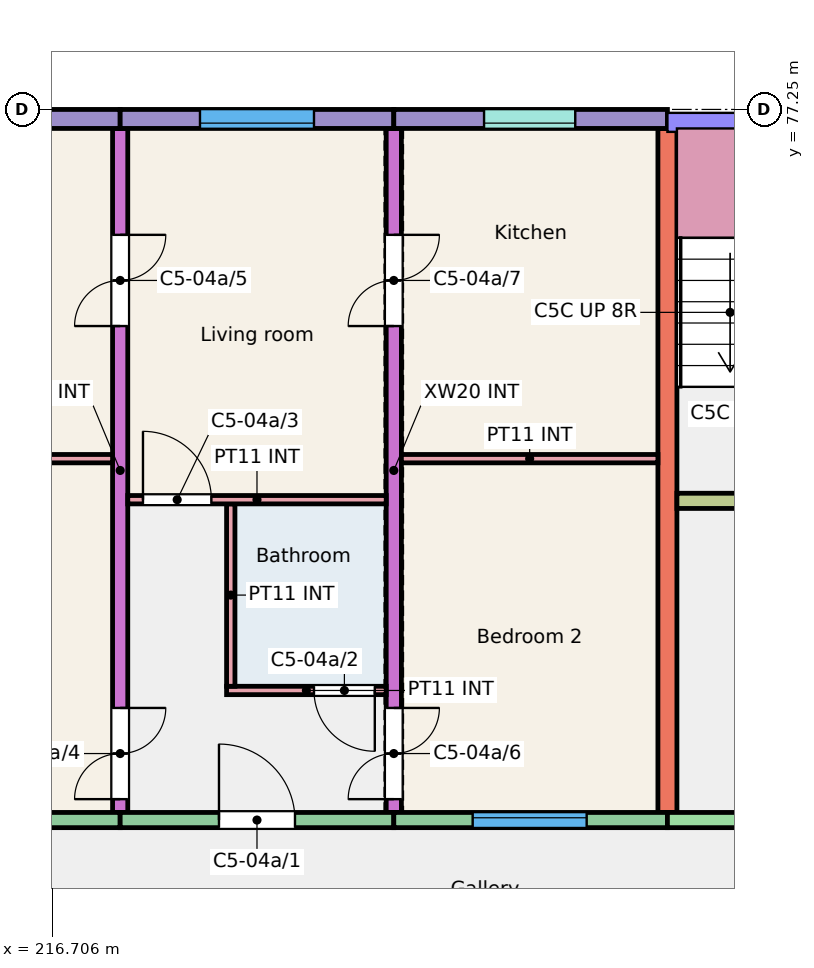
"""IFC4 building model, lengths in metres.
Left out: names, types, materials, properties, quantities, classifications, styles, units other than length and angle.
Written with IfcOpenShell. Run it as: python <this file> out.ifc"""

import sys

from ifc_helpers import new_model, si_unit, direction, frame, frame_2d, origin, place, context, subcontext, project, spatial, rectangle, extrude, element, fill, save


model = new_model("IFC4")
c1 = context("Model", 3, precision=1e-05, world=origin(), true_north=direction((0.0, 1.0)))
c2 = subcontext(c1, "Body", "Model", "MODEL_VIEW")
j1 = project(units=[si_unit("LENGTHUNIT", "METRE"), si_unit("PLANEANGLEUNIT", "RADIAN")], contexts=[c1])
p1 = place(None, origin())
s1 = spatial("IfcSite", under=j1, at=p1, CompositionType="ELEMENT")
p2 = place(p1, origin())
s2 = spatial("IfcBuilding", under=s1, at=p2, CompositionType="ELEMENT")
p3 = place(p2, frame((0.0, 0.0, 12.0)))
s3 = spatial("IfcBuildingStorey", under=s2, at=p3, CompositionType="ELEMENT", Elevation=12.0)
p4 = place(p3, frame((217.6, 68.0, 0.0), z_axis=(0.0, 0.0, 1.0), x_axis=(0.0, 1.0, 0.0)))
e1 = element("IfcWall", 1, at=p4, inside=s3, PredefinedType="SHEAR", context=c2, shape_type="SweptSolid", body=[
    extrude(rectangle(XDim=9.0, YDim=0.2, at=frame_2d((4.5, 0.0))), origin(), (0.0, 0.0, 1.0), 3.0),
])
p5 = place(p4, frame((0.175, 0.0, 0.0)))
e2 = element("IfcOpeningElement", 2, at=p5, cuts=e1, PredefinedType="OPENING", context=c2, shape_type="SweptSolid", body=[
    extrude(rectangle(XDim=1.2, YDim=2.1, at=frame_2d((0.6, 1.05))), frame((0.0, 0.11, 0.0), z_axis=(0.0, -1.0, 0.0), x_axis=(1.0, 0.0, 0.0)), (0.0, 0.0, 1.0), 0.22),
])
p6 = place(p4, frame((6.4, 0.0, 0.0)))
e3 = element("IfcOpeningElement", 3, at=p6, cuts=e1, PredefinedType="OPENING", context=c2, shape_type="SweptSolid", body=[
    extrude(rectangle(XDim=1.2, YDim=2.1, at=frame_2d((0.6, 1.05))), frame((0.0, 0.11, 0.0), z_axis=(0.0, -1.0, 0.0), x_axis=(1.0, 0.0, 0.0)), (0.0, 0.0, 1.0), 0.22),
])
p7 = place(p3, frame((221.2, 68.0, 0.0), z_axis=(0.0, 0.0, 1.0), x_axis=(0.0, 1.0, 0.0)))
e4 = element("IfcWall", 4, at=p7, inside=s3, PredefinedType="SHEAR", context=c2, shape_type="SweptSolid", body=[
    extrude(rectangle(XDim=9.0, YDim=0.2, at=frame_2d((4.5, 0.0))), origin(), (0.0, 0.0, 1.0), 3.0),
])
p8 = place(p7, frame((0.175, 0.0, 0.0)))
e5 = element("IfcOpeningElement", 5, at=p8, cuts=e4, PredefinedType="OPENING", context=c2, shape_type="SweptSolid", body=[
    extrude(rectangle(XDim=1.2, YDim=2.1, at=frame_2d((0.6, 1.05))), frame((0.0, 0.11, 0.0), z_axis=(0.0, -1.0, 0.0), x_axis=(1.0, 0.0, 0.0)), (0.0, 0.0, 1.0), 0.22),
])
p9 = place(p7, frame((6.4, 0.0, 0.0)))
e6 = element("IfcOpeningElement", 6, at=p9, cuts=e4, PredefinedType="OPENING", context=c2, shape_type="SweptSolid", body=[
    extrude(rectangle(XDim=1.2, YDim=2.1, at=frame_2d((0.6, 1.05))), frame((0.0, 0.11, 0.0), z_axis=(0.0, -1.0, 0.0), x_axis=(1.0, 0.0, 0.0)), (0.0, 0.0, 1.0), 0.22),
])
p10 = place(p3, frame((224.8, 68.0, 0.0), z_axis=(0.0, 0.0, 1.0), x_axis=(0.0, 1.0, 0.0)))
e7 = element("IfcWall", 7, at=p10, inside=s3, PredefinedType="SHEAR", context=c2, shape_type="SweptSolid", body=[
    extrude(rectangle(XDim=9.0, YDim=0.25, at=frame_2d((4.5, 0.0))), origin(), (0.0, 0.0, 1.0), 3.0),
])
p11 = place(p3, frame((214.0, 77.125, 0.0), z_axis=(0.0, 0.0, 1.0), x_axis=(1.0, 0.0, 0.0)))
e8 = element("IfcWall", 8, at=p11, inside=s3, PredefinedType="SOLIDWALL", context=c2, shape_type="SweptSolid", body=[
    extrude(rectangle(XDim=3.6, YDim=0.25, at=frame_2d((1.8, 0.0))), origin(), (0.0, 0.0, 1.0), 3.0),
])
p12 = place(p11, frame((1.075, 0.0, 0.9)))
e9 = element("IfcOpeningElement", 9, at=p12, cuts=e8, PredefinedType="OPENING", context=c2, shape_type="SweptSolid", body=[
    extrude(rectangle(XDim=1.5, YDim=1.5, at=frame_2d((0.75, 0.75))), frame((0.0, 0.135, 0.0), z_axis=(0.0, -1.0, 0.0), x_axis=(1.0, 0.0, 0.0)), (0.0, 0.0, 1.0), 0.27),
])
p13 = place(p3, frame((214.15, 67.9, 0.0), z_axis=(0.0, 0.0, 1.0), x_axis=(1.0, 0.0, 0.0)))
e10 = element("IfcWall", 10, at=p13, inside=s3, PredefinedType="SOLIDWALL", context=c2, shape_type="SweptSolid", body=[
    extrude(rectangle(XDim=3.45, YDim=0.2, at=frame_2d((1.725, 0.0))), origin(), (0.0, 0.0, 1.0), 3.0),
])
p14 = place(p13, frame((0.925, 0.0, 0.9)))
e11 = element("IfcOpeningElement", 11, at=p14, cuts=e10, PredefinedType="OPENING", context=c2, shape_type="SweptSolid", body=[
    extrude(rectangle(XDim=1.5, YDim=1.5, at=frame_2d((0.75, 0.75))), frame((0.0, 0.11, 0.0), z_axis=(0.0, -1.0, 0.0), x_axis=(1.0, 0.0, 0.0)), (0.0, 0.0, 1.0), 0.22),
])
p15 = place(p3, frame((217.6, 77.125, 0.0), z_axis=(0.0, 0.0, 1.0), x_axis=(1.0, 0.0, 0.0)))
e12 = element("IfcWall", 12, at=p15, inside=s3, PredefinedType="SOLIDWALL", context=c2, shape_type="SweptSolid", body=[
    extrude(rectangle(XDim=3.6, YDim=0.25, at=frame_2d((1.8, 0.0))), origin(), (0.0, 0.0, 1.0), 3.0),
])
p16 = place(p15, frame((1.05, 0.0, 0.9)))
e13 = element("IfcOpeningElement", 13, at=p16, cuts=e12, PredefinedType="OPENING", context=c2, shape_type="SweptSolid", body=[
    extrude(rectangle(XDim=1.5, YDim=1.5, at=frame_2d((0.75, 0.75))), frame((0.0, 0.135, 0.0), z_axis=(0.0, -1.0, 0.0), x_axis=(1.0, 0.0, 0.0)), (0.0, 0.0, 1.0), 0.27),
])
p17 = place(p3, frame((217.6, 67.9, 0.0), z_axis=(0.0, 0.0, 1.0), x_axis=(1.0, 0.0, 0.0)))
e14 = element("IfcWall", 14, at=p17, inside=s3, PredefinedType="SOLIDWALL", context=c2, shape_type="SweptSolid", body=[
    extrude(rectangle(XDim=3.6, YDim=0.2, at=frame_2d((1.8, 0.0))), origin(), (0.0, 0.0, 1.0), 3.0),
])
p18 = place(p17, frame((1.3, 0.0, 0.0)))
e15 = element("IfcOpeningElement", 15, at=p18, cuts=e14, PredefinedType="OPENING", context=c2, shape_type="SweptSolid", body=[
    extrude(rectangle(XDim=1.0, YDim=2.1, at=frame_2d((0.5, 1.05))), frame((0.0, 0.11, 0.0), z_axis=(0.0, -1.0, 0.0), x_axis=(1.0, 0.0, 0.0)), (0.0, 0.0, 1.0), 0.22),
])
p19 = place(p3, frame((221.2, 77.125, 0.0), z_axis=(0.0, 0.0, 1.0), x_axis=(1.0, 0.0, 0.0)))
e16 = element("IfcWall", 16, at=p19, inside=s3, PredefinedType="SOLIDWALL", context=c2, shape_type="SweptSolid", body=[
    extrude(rectangle(XDim=3.6, YDim=0.25, at=frame_2d((1.8, 0.0))), origin(), (0.0, 0.0, 1.0), 3.0),
])
p20 = place(p19, frame((1.188, 0.0, 1.1)))
e17 = element("IfcOpeningElement", 17, at=p20, cuts=e16, PredefinedType="OPENING", context=c2, shape_type="SweptSolid", body=[
    extrude(rectangle(XDim=1.2, YDim=1.3, at=frame_2d((0.6, 0.65))), frame((0.0, 0.135, 0.0), z_axis=(0.0, -1.0, 0.0), x_axis=(1.0, 0.0, 0.0)), (0.0, 0.0, 1.0), 0.27),
])
p21 = place(p3, frame((221.2, 67.9, 0.0), z_axis=(0.0, 0.0, 1.0), x_axis=(1.0, 0.0, 0.0)))
e18 = element("IfcWall", 18, at=p21, inside=s3, PredefinedType="SOLIDWALL", context=c2, shape_type="SweptSolid", body=[
    extrude(rectangle(XDim=3.6, YDim=0.2, at=frame_2d((1.8, 0.0))), origin(), (0.0, 0.0, 1.0), 3.0),
])
p22 = place(p21, frame((1.038, 0.0, 0.9)))
e19 = element("IfcOpeningElement", 19, at=p22, cuts=e18, PredefinedType="OPENING", context=c2, shape_type="SweptSolid", body=[
    extrude(rectangle(XDim=1.5, YDim=1.5, at=frame_2d((0.75, 0.75))), frame((0.0, 0.11, 0.0), z_axis=(0.0, -1.0, 0.0), x_axis=(1.0, 0.0, 0.0)), (0.0, 0.0, 1.0), 0.22),
])
p23 = place(p3, frame((224.8, 67.9, 0.0), z_axis=(0.0, 0.0, 1.0), x_axis=(1.0, 0.0, 0.0)))
e20 = element("IfcWall", 20, at=p23, inside=s3, PredefinedType="SHEAR", context=c2, shape_type="SweptSolid", body=[
    extrude(rectangle(XDim=5.85, YDim=0.2, at=frame_2d((2.925, 0.0))), origin(), (0.0, 0.0, 1.0), 3.0),
])
p24 = place(p23, frame((2.438, 0.0, 0.0)))
e21 = element("IfcOpeningElement", 21, at=p24, cuts=e20, PredefinedType="OPENING", context=c2, shape_type="SweptSolid", body=[
    extrude(rectangle(XDim=1.1, YDim=2.1, at=frame_2d((0.55, 1.05))), frame((0.0, 0.11, 0.0), z_axis=(0.0, -1.0, 0.0), x_axis=(1.0, 0.0, 0.0)), (0.0, 0.0, 1.0), 0.22),
])
p25 = place(p3, frame((224.925, 72.1, 0.0), z_axis=(0.0, 0.0, 1.0), x_axis=(1.0, 0.0, 0.0)))
e22 = element("IfcWall", 22, at=p25, inside=s3, PredefinedType="SHEAR", context=c2, shape_type="SweptSolid", body=[
    extrude(rectangle(XDim=5.725, YDim=0.2, at=frame_2d((2.862, 0.0))), origin(), (0.0, 0.0, 1.0), 3.0),
])
p26 = place(p25, frame((0.95, 0.0, 0.0)))
e23 = element("IfcOpeningElement", 23, at=p26, cuts=e22, PredefinedType="OPENING", context=c2, shape_type="SweptSolid", body=[
    extrude(rectangle(XDim=1.0, YDim=2.1, at=frame_2d((0.5, 1.05))), frame((0.0, 0.11, 0.0), z_axis=(0.0, -1.0, 0.0), x_axis=(1.0, 0.0, 0.0)), (0.0, 0.0, 1.0), 0.22),
])
p27 = place(p25, frame((3.863, 0.0, 0.0)))
e24 = element("IfcOpeningElement", 24, at=p27, cuts=e22, PredefinedType="OPENING", context=c2, shape_type="SweptSolid", body=[
    extrude(rectangle(XDim=1.1, YDim=2.1, at=frame_2d((0.55, 1.05))), frame((0.0, 0.11, 0.0), z_axis=(0.0, -1.0, 0.0), x_axis=(1.0, 0.0, 0.0)), (0.0, 0.0, 1.0), 0.22),
])
p28 = place(p3, frame((219.0, 69.605, 0.0), z_axis=(0.0, 0.0, 1.0), x_axis=(1.0, 0.0, 0.0)))
e25 = element("IfcWall", 25, at=p28, inside=s3, PredefinedType="PARTITIONING", context=c2, shape_type="SweptSolid", body=[
    extrude(rectangle(XDim=2.1, YDim=0.11, at=frame_2d((1.05, 0.0))), origin(), (0.0, 0.0, 1.0), 2.8),
])
p29 = place(p28, frame((1.15, 0.0, 0.0)))
e26 = element("IfcOpeningElement", 26, at=p29, cuts=e25, PredefinedType="OPENING", context=c2, shape_type="SweptSolid", body=[
    extrude(rectangle(XDim=0.8, YDim=2.1, at=frame_2d((0.4, 1.05))), frame((0.0, 0.065, 0.0), z_axis=(0.0, -1.0, 0.0), x_axis=(1.0, 0.0, 0.0)), (0.0, 0.0, 1.0), 0.13),
])
p30 = place(p3, frame((219.055, 69.66, 0.0), z_axis=(0.0, 0.0, 1.0), x_axis=(0.0, 1.0, 0.0)))
e27 = element("IfcWall", 27, at=p30, inside=s3, PredefinedType="PARTITIONING", context=c2, shape_type="SweptSolid", body=[
    extrude(rectangle(XDim=2.4, YDim=0.11, at=frame_2d((1.2, 0.0))), origin(), (0.0, 0.0, 1.0), 2.8),
])
p31 = place(p3, frame((217.7, 72.115, 0.0), z_axis=(0.0, 0.0, 1.0), x_axis=(1.0, 0.0, 0.0)))
e28 = element("IfcWall", 28, at=p31, inside=s3, PredefinedType="PARTITIONING", context=c2, shape_type="SweptSolid", body=[
    extrude(rectangle(XDim=3.4, YDim=0.11, at=frame_2d((1.7, 0.0))), origin(), (0.0, 0.0, 1.0), 2.8),
])
p32 = place(p31, frame((0.2, 0.0, 0.0)))
e29 = element("IfcOpeningElement", 29, at=p32, cuts=e28, PredefinedType="OPENING", context=c2, shape_type="SweptSolid", body=[
    extrude(rectangle(XDim=0.9, YDim=2.1, at=frame_2d((0.45, 1.05))), frame((0.0, 0.065, 0.0), z_axis=(0.0, -1.0, 0.0), x_axis=(1.0, 0.0, 0.0)), (0.0, 0.0, 1.0), 0.13),
])
p33 = place(p3, frame((214.15, 72.655, 0.0), z_axis=(0.0, 0.0, 1.0), x_axis=(1.0, 0.0, 0.0)))
e30 = element("IfcWall", 30, at=p33, inside=s3, PredefinedType="PARTITIONING", context=c2, shape_type="SweptSolid", body=[
    extrude(rectangle(XDim=3.35, YDim=0.11, at=frame_2d((1.675, 0.0))), origin(), (0.0, 0.0, 1.0), 2.8),
])
p34 = place(p3, frame((221.3, 72.655, 0.0), z_axis=(0.0, 0.0, 1.0), x_axis=(1.0, 0.0, 0.0)))
e31 = element("IfcWall", 31, at=p34, inside=s3, PredefinedType="PARTITIONING", context=c2, shape_type="SweptSolid", body=[
    extrude(rectangle(XDim=3.375, YDim=0.11, at=frame_2d((1.688, 0.0))), origin(), (0.0, 0.0, 1.0), 2.8),
])
p35 = place(p22, origin())
e32 = element("IfcWindow", 32, at=p35, inside=s3, PartitioningType="SINGLE_PANEL", PredefinedType="WINDOW", context=c2, shape_type="SweptSolid", body=[
    extrude(rectangle(XDim=1.5, YDim=1.5, at=frame_2d((0.75, 0.75))), frame((0.0, 0.06, 0.0), z_axis=(0.0, -1.0, 0.0), x_axis=(1.0, 0.0, 0.0)), (0.0, 0.0, 1.0), 0.06),
])
fill(e19, e32)
p36 = place(p20, origin())
e33 = element("IfcWindow", 33, at=p36, inside=s3, PartitioningType="SINGLE_PANEL", PredefinedType="WINDOW", context=c2, shape_type="SweptSolid", body=[
    extrude(rectangle(XDim=1.2, YDim=1.3, at=frame_2d((0.6, 0.65))), frame((0.0, -0.025, 0.0), z_axis=(0.0, -1.0, 0.0), x_axis=(1.0, 0.0, 0.0)), (0.0, 0.0, 1.0), 0.06),
])
fill(e17, e33)
p37 = place(p16, origin())
e34 = element("IfcWindow", 34, at=p37, inside=s3, PartitioningType="SINGLE_PANEL", PredefinedType="WINDOW", context=c2, shape_type="SweptSolid", body=[
    extrude(rectangle(XDim=1.5, YDim=1.5, at=frame_2d((0.75, 0.75))), frame((0.0, -0.025, 0.0), z_axis=(0.0, -1.0, 0.0), x_axis=(1.0, 0.0, 0.0)), (0.0, 0.0, 1.0), 0.06),
])
fill(e13, e34)
p38 = place(p18, origin())
e35 = element("IfcDoor", 35, at=p38, inside=s3, OperationType="SINGLE_SWING_LEFT", PredefinedType="DOOR", context=c2, shape_type="SweptSolid", body=[
    extrude(rectangle(XDim=1.0, YDim=2.1, at=frame_2d((0.5, 1.05))), frame((0.0, 0.025, 0.0), z_axis=(0.0, -1.0, 0.0), x_axis=(1.0, 0.0, 0.0)), (0.0, 0.0, 1.0), 0.05),
])
fill(e15, e35)
p39 = place(p29, origin())
e36 = element("IfcDoor", 36, at=p39, inside=s3, OperationType="SINGLE_SWING_RIGHT", PredefinedType="DOOR", context=c2, shape_type="SweptSolid", body=[
    extrude(rectangle(XDim=0.8, YDim=2.1, at=frame_2d((0.4, 1.05))), frame((0.0, 0.025, 0.0), z_axis=(0.0, -1.0, 0.0), x_axis=(1.0, 0.0, 0.0)), (0.0, 0.0, 1.0), 0.05),
])
fill(e26, e36)
p40 = place(p32, origin())
e37 = element("IfcDoor", 37, at=p40, inside=s3, OperationType="SINGLE_SWING_LEFT", PredefinedType="DOOR", context=c2, shape_type="SweptSolid", body=[
    extrude(rectangle(XDim=0.9, YDim=2.1, at=frame_2d((0.45, 1.05))), frame((0.0, 0.025, 0.0), z_axis=(0.0, -1.0, 0.0), x_axis=(1.0, 0.0, 0.0)), (0.0, 0.0, 1.0), 0.05),
])
fill(e29, e37)
p41 = place(p5, origin())
e38 = element("IfcDoor", 38, at=p41, inside=s3, OperationType="DOUBLE_DOOR_SINGLE_SWING", PredefinedType="DOOR", context=c2, shape_type="SweptSolid", body=[
    extrude(rectangle(XDim=1.2, YDim=2.1, at=frame_2d((0.6, 1.05))), frame((0.0, 0.025, 0.0), z_axis=(0.0, -1.0, 0.0), x_axis=(1.0, 0.0, 0.0)), (0.0, 0.0, 1.0), 0.05),
])
fill(e2, e38)
p42 = place(p6, origin())
e39 = element("IfcDoor", 39, at=p42, inside=s3, OperationType="DOUBLE_DOOR_SINGLE_SWING", PredefinedType="DOOR", context=c2, shape_type="SweptSolid", body=[
    extrude(rectangle(XDim=1.2, YDim=2.1, at=frame_2d((0.6, 1.05))), frame((0.0, 0.025, 0.0), z_axis=(0.0, -1.0, 0.0), x_axis=(1.0, 0.0, 0.0)), (0.0, 0.0, 1.0), 0.05),
])
fill(e3, e39)
p43 = place(p8, origin())
e40 = element("IfcDoor", 40, at=p43, inside=s3, OperationType="DOUBLE_DOOR_SINGLE_SWING", PredefinedType="DOOR", context=c2, shape_type="SweptSolid", body=[
    extrude(rectangle(XDim=1.2, YDim=2.1, at=frame_2d((0.6, 1.05))), frame((0.0, 0.025, 0.0), z_axis=(0.0, -1.0, 0.0), x_axis=(1.0, 0.0, 0.0)), (0.0, 0.0, 1.0), 0.05),
])
fill(e5, e40)
p44 = place(p9, origin())
e41 = element("IfcDoor", 41, at=p44, inside=s3, OperationType="DOUBLE_DOOR_SINGLE_SWING", PredefinedType="DOOR", context=c2, shape_type="SweptSolid", body=[
    extrude(rectangle(XDim=1.2, YDim=2.1, at=frame_2d((0.6, 1.05))), frame((0.0, 0.025, 0.0), z_axis=(0.0, -1.0, 0.0), x_axis=(1.0, 0.0, 0.0)), (0.0, 0.0, 1.0), 0.05),
])
fill(e6, e41)
save(model, sys.argv[1])
